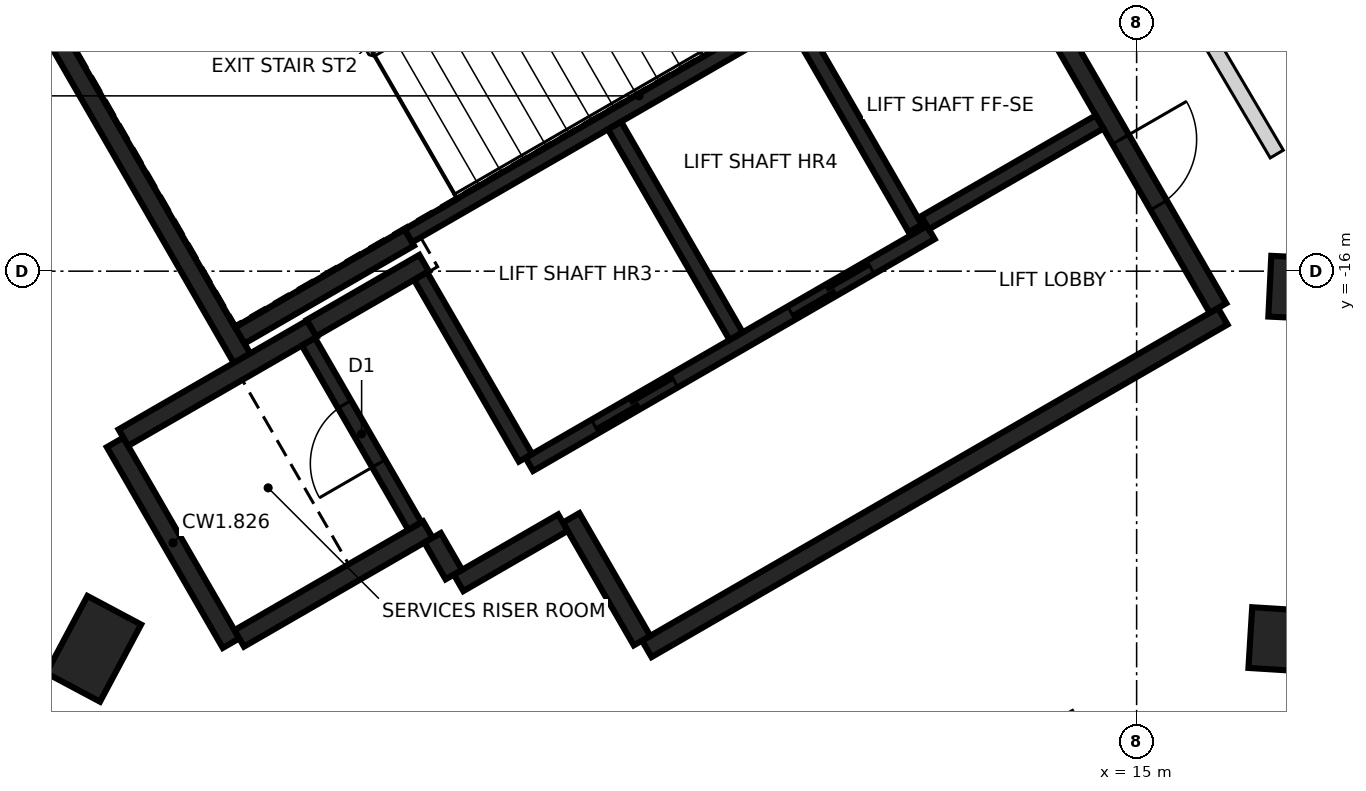
"""IFC4 building model, lengths in metres.
Left out: names, types, materials, properties, quantities, classifications, styles, units other than length and angle.
Written with IfcOpenShell. Run it as: python <this file> out.ifc"""

import sys

from ifc_helpers import new_model, si_unit, direction, frame, frame_2d, origin, origin_2d, place, context, subcontext, project, spatial, rectangle, extrude, element, fill, save


model = new_model("IFC4")
c1 = context("Model", 3, precision=1e-05, world=origin(), true_north=direction((0.0, 1.0)))
c2 = subcontext(c1, "Body", "Model", "MODEL_VIEW")
j1 = project(units=[si_unit("LENGTHUNIT", "METRE"), si_unit("PLANEANGLEUNIT", "RADIAN")], contexts=[c1])
p1 = place(None, origin())
s1 = spatial("IfcSite", under=j1, at=p1, CompositionType="ELEMENT")
p2 = place(p1, origin())
s2 = spatial("IfcBuilding", under=s1, at=p2, CompositionType="ELEMENT")
p3 = place(p2, frame((0.0, 0.0, 190.0)))
s3 = spatial("IfcBuildingStorey", under=s2, at=p3, CompositionType="ELEMENT", Elevation=190.0)
for number, where, z_axis, x_axis in (
    (1, (17.07, -20.856, -0.35), (0.0, 0.0, 1.0), (-0.998, 0.062, 0.0)),
    (2, (17.326, -16.226, -0.35), (0.0, 0.0, 1.0), (-0.999, 0.048, 0.0)),
    (3, (1.279, -20.968, -0.35), (0.0, 0.0, 1.0), (0.47, 0.883, 0.0)),
):
    element("IfcColumn", number, at=place(p3, frame(where, z_axis=z_axis, x_axis=x_axis)), inside=s3, PredefinedType="COLUMN", context=c2, shape_type="SweptSolid", body=[
        extrude(rectangle(XDim=1.15, YDim=0.8, at=origin_2d()), origin(), (0.0, 0.0, 1.0), 3.6),
    ])
p4 = place(p3, frame((16.133, -16.594, 0.0), z_axis=(0.0, 0.0, 1.0), x_axis=(-0.866022959057, -0.500004234368, 0.0)))
e4 = element("IfcWall", 4, at=p4, inside=s3, PredefinedType="SHEAR", context=c2, shape_type="SweptSolid", body=[
    extrude(rectangle(XDim=8.75, YDim=0.25, at=frame_2d((4.375, 0.0))), origin(), (0.0, 0.0, 1.0), 3.25),
])
p5 = place(p3, frame((13.008, -11.181, 0.0), z_axis=(0.0, 0.0, 1.0), x_axis=(0.500001955336, -0.866024274868, 0.0)))
e5 = element("IfcWall", 5, at=p5, inside=s3, PredefinedType="SHEAR", context=c2, shape_type="SweptSolid", body=[
    extrude(rectangle(XDim=6.125, YDim=0.25, at=frame_2d((3.062, 0.0))), origin(), (0.0, 0.0, 1.0), 3.25),
])
p6 = place(p5, frame((3.563, 0.0, 0.0)))
e6 = element("IfcOpeningElement", 6, at=p6, cuts=e5, PredefinedType="OPENING", context=c2, shape_type="SweptSolid", body=[
    extrude(rectangle(XDim=1.0, YDim=2.1, at=frame_2d((0.5, 1.05))), frame((0.0, 0.135, 0.0), z_axis=(0.0, -1.0, 0.0), x_axis=(1.0, 0.0, 0.0)), (0.0, 0.0, 1.0), 0.27),
])
p7 = place(p3, frame((3.235, -17.153, 0.0), z_axis=(0.0, 0.0, 1.0), x_axis=(-0.500008851346, 0.866020293397, 0.0)))
e7 = element("IfcWall", 7, at=p7, inside=s3, PredefinedType="SHEAR", context=c2, shape_type="SweptSolid", body=[
    extrude(rectangle(XDim=5.51, YDim=0.25, at=frame_2d((2.755, 0.0))), origin(), (0.0, 0.0, 1.0), 3.25),
])
p8 = place(p3, frame((3.085, -20.894, 0.0), z_axis=(0.0, 0.0, 1.0), x_axis=(-0.499978833458, 0.866037623948, 0.0)))
e8 = element("IfcWall", 8, at=p8, inside=s3, PredefinedType="SHEAR", context=c2, shape_type="SweptSolid", body=[
    extrude(rectangle(XDim=3.05, YDim=0.25, at=frame_2d((1.525, 0.0))), origin(), (0.0, 0.0, 1.0), 3.25),
])
p9 = place(p3, frame((1.669, -18.19, 0.0), z_axis=(0.0, 0.0, 1.0), x_axis=(0.866042235819, 0.499970844928, 0.0)))
e9 = element("IfcWall", 9, at=p9, inside=s3, PredefinedType="SHEAR", context=c2, shape_type="SweptSolid", body=[
    extrude(rectangle(XDim=2.865, YDim=0.25, at=frame_2d((1.432, 0.0))), origin(), (0.0, 0.0, 1.0), 3.25),
])
p10 = place(p3, frame((5.675, -19.399, 0.0), z_axis=(0.0, 0.0, 1.0), x_axis=(-0.866026637627, -0.499997862916, 0.0)))
e10 = element("IfcWall", 10, at=p10, inside=s3, PredefinedType="SHEAR", context=c2, shape_type="SweptSolid", body=[
    extrude(rectangle(XDim=2.865, YDim=0.25, at=frame_2d((1.432, 0.0))), origin(), (0.0, 0.0, 1.0), 3.25),
])
p11 = place(p3, frame((5.431, -15.556, 0.0), z_axis=(0.0, 0.0, 1.0), x_axis=(-0.866022940537, -0.500004266446, 0.0)))
e11 = element("IfcWall", 11, at=p11, inside=s3, PredefinedType="SHEAR", context=c2, shape_type="SweptSolid", body=[
    extrude(rectangle(XDim=2.575, YDim=0.25, at=frame_2d((1.287, 0.0))), origin(), (0.0, 0.0, 1.0), 3.25),
])
p12 = place(p3, frame((8.493, -20.86, 0.0), z_axis=(0.0, 0.0, 1.0), x_axis=(-0.500039802285, 0.866002422705, 0.0)))
e12 = element("IfcWall", 12, at=p12, inside=s3, PredefinedType="SHEAR", context=c2, shape_type="SweptSolid", body=[
    extrude(rectangle(XDim=1.865, YDim=0.25, at=frame_2d((0.932, 0.0))), origin(), (0.0, 0.0, 1.0), 3.25),
])
p13 = place(p3, frame((4.145, -16.749, 0.0), z_axis=(0.0, 0.0, 1.0), x_axis=(0.866038183914, 0.499977863513, 0.0)))
e13 = element("IfcWall", 13, at=p13, inside=s3, PredefinedType="SHEAR", context=c2, shape_type="SweptSolid", body=[
    extrude(rectangle(XDim=1.71, YDim=0.25, at=frame_2d((0.855, 0.0))), origin(), (0.0, 0.0, 1.0), 3.25),
])
p14 = place(p3, frame((7.452, -19.308, 0.0), z_axis=(0.0, 0.0, 1.0), x_axis=(-0.866044474677, -0.49996696679, 0.0)))
e14 = element("IfcWall", 14, at=p14, inside=s3, PredefinedType="SHEAR", context=c2, shape_type="SweptSolid", body=[
    extrude(rectangle(XDim=1.584, YDim=0.25, at=frame_2d((0.792, 0.0))), origin(), (0.0, 0.0, 1.0), 3.25),
])
p15 = place(p3, frame((6.017, -19.992, 0.0), z_axis=(0.0, 0.0, 1.0), x_axis=(-0.500364886717, 0.865814633822, 0.0)))
e15 = element("IfcWall", 15, at=p15, inside=s3, PredefinedType="SHEAR", context=c2, shape_type="SweptSolid", body=[
    extrude(rectangle(XDim=0.559, YDim=0.25, at=frame_2d((0.28, 0.0))), origin(), (0.0, 0.0, 1.0), 3.25),
])
p16 = place(p3, frame((5.419, -15.534, 0.0), z_axis=(0.0, 0.0, 1.0), x_axis=(0.866029065029, 0.499993658486, 0.0)))
e16 = element("IfcWall", 16, at=p16, inside=s3, PredefinedType="SHEAR", context=c2, shape_type="SweptSolid", body=[
    extrude(rectangle(XDim=5.974, YDim=0.2, at=frame_2d((2.987, 0.0))), origin(), (0.0, 0.0, 1.0), 3.25),
])
p17 = place(p3, frame((7.01, -18.542, 0.0), z_axis=(0.0, 0.0, 1.0), x_axis=(0.866030299012, 0.499991521122, 0.0)))
e17 = element("IfcWall", 17, at=p17, inside=s3, PredefinedType="SHEAR", context=c2, shape_type="SweptSolid", body=[
    extrude(rectangle(XDim=6.1, YDim=0.2, at=frame_2d((3.05, 0.0))), origin(), (0.0, 0.0, 1.0), 3.25),
])
p18 = place(p17, frame((1.0, 0.0, 0.0)))
e18 = element("IfcOpeningElement", 18, at=p18, cuts=e17, PredefinedType="OPENING", context=c2, shape_type="SweptSolid", body=[
    extrude(rectangle(XDim=1.2, YDim=2.1, at=frame_2d((0.6, 1.05))), frame((0.0, 0.11, 0.0), z_axis=(0.0, -1.0, 0.0), x_axis=(1.0, 0.0, 0.0)), (0.0, 0.0, 1.0), 0.22),
])
p19 = place(p17, frame((3.982, 0.0, 0.0)))
e19 = element("IfcOpeningElement", 19, at=p19, cuts=e17, PredefinedType="OPENING", context=c2, shape_type="SweptSolid", body=[
    extrude(rectangle(XDim=1.2, YDim=2.1, at=frame_2d((0.6, 1.05))), frame((0.0, 0.11, 0.0), z_axis=(0.0, -1.0, 0.0), x_axis=(1.0, 0.0, 0.0)), (0.0, 0.0, 1.0), 0.22),
])
p20 = place(p3, frame((8.132, -14.084, 0.0), z_axis=(0.0, 0.0, 1.0), x_axis=(0.499997778408, -0.866026686418, 0.0)))
e20 = element("IfcWall", 20, at=p20, inside=s3, PredefinedType="SHEAR", context=c2, shape_type="SweptSolid", body=[
    extrude(rectangle(XDim=3.198, YDim=0.2, at=frame_2d((1.599, 0.0))), origin(), (0.0, 0.0, 1.0), 3.25),
])
p21 = place(p3, frame((5.503, -19.352, 0.0), z_axis=(0.0, 0.0, 1.0), x_axis=(-0.499986818241, 0.866033014143, 0.0)))
e21 = element("IfcWall", 21, at=p21, inside=s3, PredefinedType="SHEAR", context=c2, shape_type="SweptSolid", body=[
    extrude(rectangle(XDim=2.798, YDim=0.2, at=frame_2d((1.399, 0.0))), origin(), (0.0, 0.0, 1.0), 3.25),
])
p22 = place(p21, frame((0.949, 0.0, 0.0)))
e22 = element("IfcOpeningElement", 22, at=p22, cuts=e21, PredefinedType="OPENING", context=c2, shape_type="SweptSolid", body=[
    extrude(rectangle(XDim=0.9, YDim=2.1, at=frame_2d((0.45, 1.05))), frame((0.0, 0.11, 0.0), z_axis=(0.0, -1.0, 0.0), x_axis=(1.0, 0.0, 0.0)), (0.0, 0.0, 1.0), 0.22),
])
p23 = place(p3, frame((6.96, -18.455, 0.0), z_axis=(0.0, 0.0, 1.0), x_axis=(-0.499926705758, 0.866067716099, 0.0)))
e23 = element("IfcWall", 23, at=p23, inside=s3, PredefinedType="SHEAR", context=c2, shape_type="SweptSolid", body=[
    extrude(rectangle(XDim=2.759, YDim=0.2, at=frame_2d((1.38, 0.0))), origin(), (0.0, 0.0, 1.0), 3.25),
])
p24 = place(p3, frame((12.088, -15.437, 0.0), z_axis=(0.0, 0.0, 1.0), x_axis=(-0.500026960575, 0.86600983753, 0.0)))
e24 = element("IfcWall", 24, at=p24, inside=s3, PredefinedType="SHEAR", context=c2, shape_type="SweptSolid", body=[
    extrude(rectangle(XDim=3.1, YDim=0.2, at=frame_2d((1.55, 0.0))), origin(), (0.0, 0.0, 1.0), 3.25),
])
p25 = place(p3, frame((14.512, -14.037, 0.0), z_axis=(0.0, 0.0, 1.0), x_axis=(-0.866018407898, -0.500012117035, 0.0)))
e25 = element("IfcWall", 25, at=p25, inside=s3, PredefinedType="SHEAR", context=c2, shape_type="SweptSolid", body=[
    extrude(rectangle(XDim=2.651, YDim=0.2, at=frame_2d((1.325, 0.0))), origin(), (0.0, 0.0, 1.0), 3.25),
])
p26 = place(p3, frame((11.571, -5.505, 0.0), z_axis=(0.0, 0.0, 1.0), x_axis=(0.507402039651, -0.861709446483, 0.0)))
e26 = element("IfcWall", 26, at=p26, inside=s3, PredefinedType="PARTITIONING", context=c2, shape_type="SweptSolid", body=[
    extrude(rectangle(XDim=10.391, YDim=0.2, at=frame_2d((5.196, 0.0))), origin(), (0.0, 0.0, 1.0), 3.25),
])
p27 = place(p26, frame((6.491, 0.0, 0.0)))
e27 = element("IfcOpeningElement", 27, at=p27, cuts=e26, PredefinedType="OPENING", context=c2, shape_type="SweptSolid", body=[
    extrude(rectangle(XDim=0.95, YDim=2.1, at=frame_2d((0.475, 1.05))), frame((0.0, 0.11, 0.0), z_axis=(0.0, -1.0, 0.0), x_axis=(1.0, 0.0, 0.0)), (0.0, 0.0, 1.0), 0.22),
])
p28 = place(p18, origin())
e28 = element("IfcDoor", 28, at=p28, inside=s3, OperationType="DOUBLE_DOOR_SLIDING", PredefinedType="DOOR", context=c2, shape_type="SweptSolid", body=[
    extrude(rectangle(XDim=1.2, YDim=2.1, at=frame_2d((0.6, 1.05))), frame((0.0, 0.025, 0.0), z_axis=(0.0, -1.0, 0.0), x_axis=(1.0, 0.0, 0.0)), (0.0, 0.0, 1.0), 0.05),
])
fill(e18, e28)
p29 = place(p19, origin())
e29 = element("IfcDoor", 29, at=p29, inside=s3, OperationType="DOUBLE_DOOR_SLIDING", PredefinedType="DOOR", context=c2, shape_type="SweptSolid", body=[
    extrude(rectangle(XDim=1.2, YDim=2.1, at=frame_2d((0.6, 1.05))), frame((0.0, 0.025, 0.0), z_axis=(0.0, -1.0, 0.0), x_axis=(1.0, 0.0, 0.0)), (0.0, 0.0, 1.0), 0.05),
])
fill(e19, e29)
p30 = place(p6, origin())
e30 = element("IfcDoor", 30, at=p30, inside=s3, OperationType="SINGLE_SWING_LEFT", PredefinedType="DOOR", context=c2, shape_type="SweptSolid", body=[
    extrude(rectangle(XDim=1.0, YDim=2.1, at=frame_2d((0.5, 1.05))), frame((0.0, 0.025, 0.0), z_axis=(0.0, -1.0, 0.0), x_axis=(1.0, 0.0, 0.0)), (0.0, 0.0, 1.0), 0.05),
])
fill(e6, e30)
p31 = place(p22, origin())
e31 = element("IfcDoor", 31, at=p31, inside=s3, OperationType="SINGLE_SWING_RIGHT", PredefinedType="DOOR", context=c2, shape_type="SweptSolid", body=[
    extrude(rectangle(XDim=0.9, YDim=2.1, at=frame_2d((0.45, 1.05))), frame((0.0, 0.025, 0.0), z_axis=(0.0, -1.0, 0.0), x_axis=(1.0, 0.0, 0.0)), (0.0, 0.0, 1.0), 0.05),
])
fill(e22, e31)
save(model, sys.argv[1])
